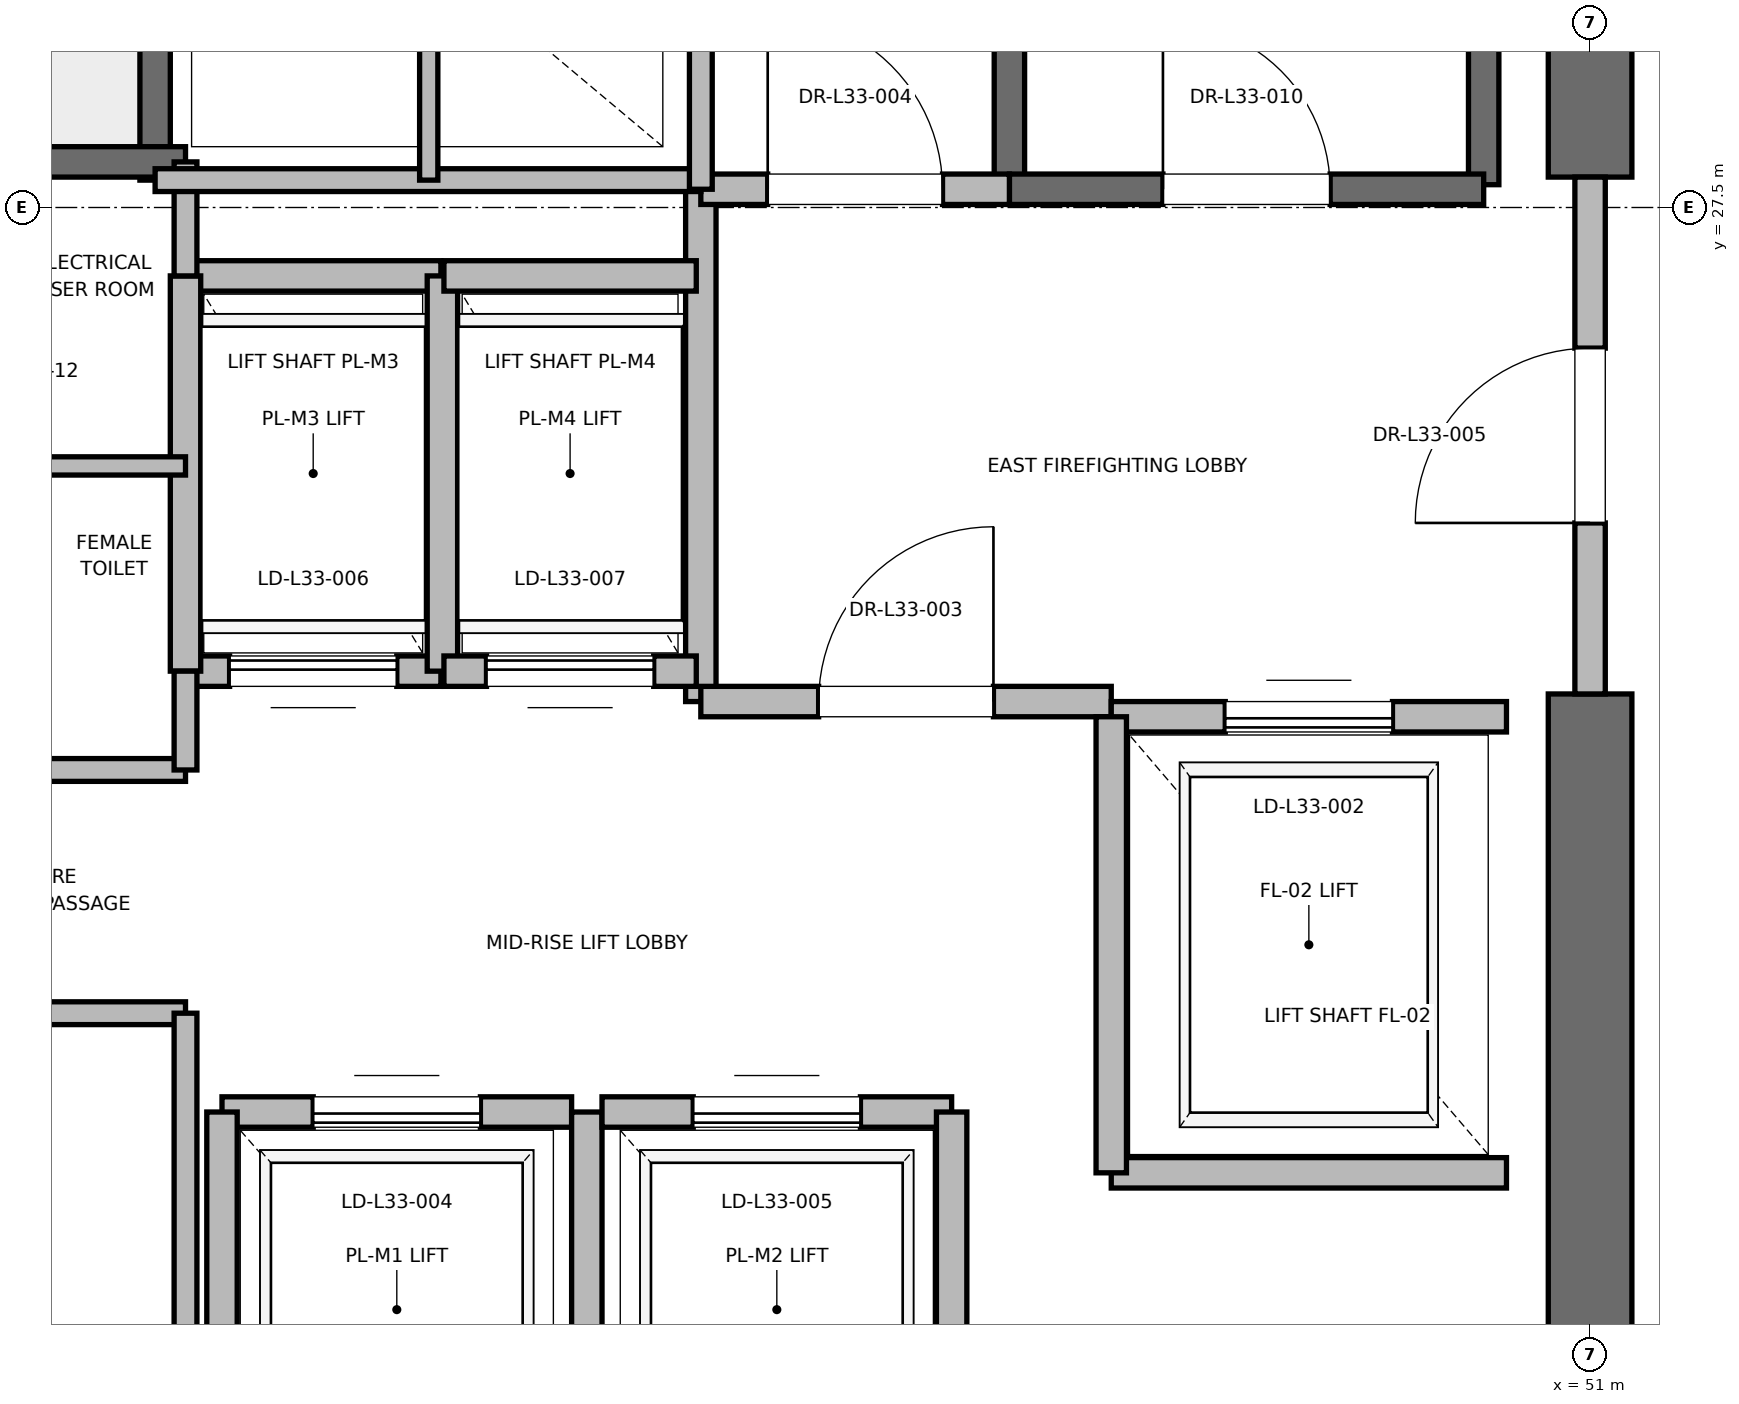
"""IFC4 building model, lengths in metres.
Left out: names, types, materials, properties, quantities, classifications, styles, units other than length and angle.
Written with IfcOpenShell. Run it as: python <this file> out.ifc"""

import sys

from ifc_helpers import new_model, si_unit, direction, frame, frame_2d, origin, place, context, subcontext, project, spatial, rectangle, extrude, element, fill, save


model = new_model("IFC4")
c1 = context("Model", 3, precision=1e-05, world=origin(), true_north=direction((0.0, 1.0)))
c2 = subcontext(c1, "Body", "Model", "MODEL_VIEW")
j1 = project(units=[si_unit("LENGTHUNIT", "METRE"), si_unit("PLANEANGLEUNIT", "RADIAN")], contexts=[c1])
p1 = place(None, origin())
s1 = spatial("IfcSite", under=j1, at=p1, CompositionType="ELEMENT")
p2 = place(p1, origin())
s2 = spatial("IfcBuilding", under=s1, at=p2, CompositionType="ELEMENT")
p3 = place(p2, frame((0.0, 0.0, 144.4)))
s3 = spatial("IfcBuildingStorey", under=s2, at=p3, CompositionType="ELEMENT", Elevation=144.4)
p4 = place(p3, frame((51.0, 18.5, 0.0), z_axis=(0.0, 0.0, 1.0), x_axis=(0.0, 1.0, 0.0)))
e1 = element("IfcWall", 1, at=p4, inside=s3, PredefinedType="SHEAR", context=c2, shape_type="SweptSolid", body=[
    extrude(rectangle(XDim=5.8, YDim=0.55, at=frame_2d((2.9, 0.0))), origin(), (0.0, 0.0, 1.0), 3.775),
])
p5 = place(p3, frame((51.0, 27.7, 0.0), z_axis=(0.0, 0.0, 1.0), x_axis=(0.0, 1.0, 0.0)))
e2 = element("IfcWall", 2, at=p5, inside=s3, PredefinedType="SHEAR", context=c2, shape_type="SweptSolid", body=[
    extrude(rectangle(XDim=8.8, YDim=0.55, at=frame_2d((4.4, 0.0))), origin(), (0.0, 0.0, 1.0), 3.775),
])
p6 = place(p3, frame((50.3, 27.65, 0.0), z_axis=(0.0, 0.0, 1.0), x_axis=(0.0, 1.0, 0.0)))
e3 = element("IfcWall", 3, at=p6, inside=s3, PredefinedType="SOLIDWALL", context=c2, shape_type="SweptSolid", body=[
    extrude(rectangle(XDim=8.15, YDim=0.2, at=frame_2d((4.075, 0.0))), origin(), (0.0, 0.0, 1.0), 3.775),
])
p7 = place(p3, frame((47.18, 27.62, 0.0), z_axis=(0.0, 0.0, 1.0), x_axis=(0.0, 1.0, 0.0)))
e4 = element("IfcWall", 4, at=p7, inside=s3, PredefinedType="SOLIDWALL", context=c2, shape_type="SweptSolid", body=[
    extrude(rectangle(XDim=8.18, YDim=0.2, at=frame_2d((4.09, 0.0))), origin(), (0.0, 0.0, 1.0), 3.775),
])
p8 = place(p3, frame((47.18, 27.62, 0.0), z_axis=(0.0, 0.0, 1.0), x_axis=(1.0, 0.0, 0.0)))
e5 = element("IfcWall", 5, at=p8, inside=s3, PredefinedType="SOLIDWALL", context=c2, shape_type="SweptSolid", body=[
    extrude(rectangle(XDim=3.12, YDim=0.2, at=frame_2d((1.56, 0.0))), origin(), (0.0, 0.0, 1.0), 3.775),
])
p9 = place(p8, frame((1.01, 0.0, 0.0)))
e6 = element("IfcOpeningElement", 6, at=p9, cuts=e5, PredefinedType="OPENING", context=c2, shape_type="SweptSolid", body=[
    extrude(rectangle(XDim=1.1, YDim=2.15, at=frame_2d((0.55, 1.075))), frame((0.0, 0.1, 0.0), z_axis=(0.0, -1.0, 0.0), x_axis=(1.0, 0.0, 0.0)), (0.0, 0.0, 1.0), 0.2),
])
p10 = place(p3, frame((41.56, 27.68, 0.0), z_axis=(0.0, 0.0, 1.0), x_axis=(0.0, 1.0, 0.0)))
e7 = element("IfcWall", 7, at=p10, inside=s3, PredefinedType="SOLIDWALL", context=c2, shape_type="SweptSolid", body=[
    extrude(rectangle(XDim=8.57, YDim=0.2, at=frame_2d((4.285, 0.0))), origin(), (0.0, 0.0, 1.0), 3.775),
])
p11 = place(p3, frame((38.44, 27.8, 0.0), z_axis=(0.0, 0.0, 1.0), x_axis=(1.0, 0.0, 0.0)))
e8 = element("IfcWall", 8, at=p11, inside=s3, PredefinedType="SOLIDWALL", context=c2, shape_type="SweptSolid", body=[
    extrude(rectangle(XDim=3.32, YDim=0.2, at=frame_2d((1.66, 0.0))), origin(), (0.0, 0.0, 1.0), 3.775),
])
p12 = place(p3, frame((45.15, 24.25, 0.0), z_axis=(0.0, 0.0, 1.0), x_axis=(0.0, 1.0, 0.0)))
e9 = element("IfcWall", 9, at=p12, inside=s3, PredefinedType="PARTITIONING", context=c2, shape_type="SweptSolid", body=[
    extrude(rectangle(XDim=3.37, YDim=0.2, at=frame_2d((1.685, 0.0))), origin(), (0.0, 0.0, 1.0), 3.775),
])
p13 = place(p3, frame((45.15, 24.25, 0.0), z_axis=(0.0, 0.0, 1.0), x_axis=(1.0, 0.0, 0.0)))
e10 = element("IfcWall", 10, at=p13, inside=s3, PredefinedType="PARTITIONING", context=c2, shape_type="SweptSolid", body=[
    extrude(rectangle(XDim=2.7, YDim=0.2, at=frame_2d((1.35, 0.0))), origin(), (0.0, 0.0, 1.0), 3.775),
])
p14 = place(p13, frame((0.775, 0.0, 0.0)))
e11 = element("IfcOpeningElement", 11, at=p14, cuts=e10, PredefinedType="OPENING", context=c2, shape_type="SweptSolid", body=[
    extrude(rectangle(XDim=1.15, YDim=2.2, at=frame_2d((0.575, 1.1))), frame((0.0, 0.1, 0.0), z_axis=(0.0, -1.0, 0.0), x_axis=(1.0, 0.0, 0.0)), (0.0, 0.0, 1.0), 0.2),
])
p15 = place(p3, frame((45.15, 27.62, 0.0), z_axis=(0.0, 0.0, 1.0), x_axis=(1.0, 0.0, 0.0)))
e12 = element("IfcWall", 12, at=p15, inside=s3, PredefinedType="PARTITIONING", context=c2, shape_type="SweptSolid", body=[
    extrude(rectangle(XDim=2.03, YDim=0.2, at=frame_2d((1.015, 0.0))), origin(), (0.0, 0.0, 1.0), 3.775),
])
p16 = place(p15, frame((0.44, 0.0, 0.0)))
e13 = element("IfcOpeningElement", 13, at=p16, cuts=e12, PredefinedType="OPENING", context=c2, shape_type="SweptSolid", body=[
    extrude(rectangle(XDim=1.15, YDim=2.2, at=frame_2d((0.575, 1.1))), frame((0.0, 0.1, 0.0), z_axis=(0.0, -1.0, 0.0), x_axis=(1.0, 0.0, 0.0)), (0.0, 0.0, 1.0), 0.2),
])
p17 = place(p3, frame((51.0, 24.3, 0.0), z_axis=(0.0, 0.0, 1.0), x_axis=(0.0, 1.0, 0.0)))
e14 = element("IfcWall", 14, at=p17, inside=s3, PredefinedType="PARTITIONING", context=c2, shape_type="SweptSolid", body=[
    extrude(rectangle(XDim=3.4, YDim=0.2, at=frame_2d((1.7, 0.0))), origin(), (0.0, 0.0, 1.0), 2.755),
])
p18 = place(p17, frame((1.125, 0.0, 0.0)))
e15 = element("IfcOpeningElement", 15, at=p18, cuts=e14, PredefinedType="OPENING", context=c2, shape_type="SweptSolid", body=[
    extrude(rectangle(XDim=1.15, YDim=2.2, at=frame_2d((0.575, 1.1))), frame((0.0, 0.1, 0.0), z_axis=(0.0, -1.0, 0.0), x_axis=(1.0, 0.0, 0.0)), (0.0, 0.0, 1.0), 0.2),
])
p19 = place(p3, frame((47.85, 21.15, 0.0), z_axis=(0.0, 0.0, 1.0), x_axis=(1.0, 0.0, 0.0)))
e16 = element("IfcWall", 16, at=p19, inside=s3, PredefinedType="SOLIDWALL", context=c2, shape_type="SweptSolid", body=[
    extrude(rectangle(XDim=2.6, YDim=0.2, at=frame_2d((1.3, 0.0))), origin(), (0.0, 0.0, 1.0), 3.775),
])
p20 = place(p3, frame((50.45, 24.15, 0.0), z_axis=(0.0, 0.0, 1.0), x_axis=(-1.0, 0.0, 0.0)))
e17 = element("IfcWall", 17, at=p20, inside=s3, PredefinedType="SOLIDWALL", context=c2, shape_type="SweptSolid", body=[
    extrude(rectangle(XDim=2.6, YDim=0.2, at=frame_2d((1.3, 0.0))), origin(), (0.0, 0.0, 1.0), 2.755),
])
p21 = place(p20, frame((0.75, 0.0, 0.0)))
e18 = element("IfcOpeningElement", 18, at=p21, cuts=e17, PredefinedType="OPENING", context=c2, shape_type="SweptSolid", body=[
    extrude(rectangle(XDim=1.1, YDim=2.2, at=frame_2d((0.55, 1.1))), frame((0.0, 0.1, 0.0), z_axis=(0.0, -1.0, 0.0), x_axis=(1.0, 0.0, 0.0)), (0.0, 0.0, 1.0), 0.2),
])
p22 = place(p3, frame((47.85, 24.15, 0.0), z_axis=(0.0, 0.0, 1.0), x_axis=(0.0, -1.0, 0.0)))
e19 = element("IfcWall", 19, at=p22, inside=s3, PredefinedType="SOLIDWALL", context=c2, shape_type="SweptSolid", body=[
    extrude(rectangle(XDim=3.0, YDim=0.2, at=frame_2d((1.5, 0.0))), origin(), (0.0, 0.0, 1.0), 3.775),
])
p23 = place(p3, frame((44.3, 21.55, 0.0), z_axis=(0.0, 0.0, 1.0), x_axis=(-1.0, 0.0, 0.0)))
e20 = element("IfcWall", 20, at=p23, inside=s3, PredefinedType="SOLIDWALL", context=c2, shape_type="SweptSolid", body=[
    extrude(rectangle(XDim=2.3, YDim=0.2, at=frame_2d((1.15, 0.0))), origin(), (0.0, 0.0, 1.0), 3.775),
])
p24 = place(p23, frame((0.6, 0.0, 0.0)))
e21 = element("IfcOpeningElement", 21, at=p24, cuts=e20, PredefinedType="OPENING", context=c2, shape_type="SweptSolid", body=[
    extrude(rectangle(XDim=1.1, YDim=2.2, at=frame_2d((0.55, 1.1))), frame((0.0, 0.1, 0.0), z_axis=(0.0, -1.0, 0.0), x_axis=(1.0, 0.0, 0.0)), (0.0, 0.0, 1.0), 0.2),
])
p25 = place(p3, frame((42.0, 21.55, 0.0), z_axis=(0.0, 0.0, 1.0), x_axis=(0.0, -1.0, 0.0)))
e22 = element("IfcWall", 22, at=p25, inside=s3, PredefinedType="SOLIDWALL", context=c2, shape_type="SweptSolid", body=[
    extrude(rectangle(XDim=2.6, YDim=0.2, at=frame_2d((1.3, 0.0))), origin(), (0.0, 0.0, 1.0), 2.755),
])
p26 = place(p3, frame((44.4, 18.95, 0.0), z_axis=(0.0, 0.0, 1.0), x_axis=(0.0, 1.0, 0.0)))
e23 = element("IfcWall", 23, at=p26, inside=s3, PredefinedType="SOLIDWALL", context=c2, shape_type="SweptSolid", body=[
    extrude(rectangle(XDim=2.6, YDim=0.2, at=frame_2d((1.3, 0.0))), origin(), (0.0, 0.0, 1.0), 3.775),
])
p27 = place(p3, frame((46.8, 21.55, 0.0), z_axis=(0.0, 0.0, 1.0), x_axis=(-1.0, 0.0, 0.0)))
e24 = element("IfcWall", 24, at=p27, inside=s3, PredefinedType="SOLIDWALL", context=c2, shape_type="SweptSolid", body=[
    extrude(rectangle(XDim=2.3, YDim=0.2, at=frame_2d((1.15, 0.0))), origin(), (0.0, 0.0, 1.0), 3.775),
])
p28 = place(p27, frame((0.6, 0.0, 0.0)))
e25 = element("IfcOpeningElement", 25, at=p28, cuts=e24, PredefinedType="OPENING", context=c2, shape_type="SweptSolid", body=[
    extrude(rectangle(XDim=1.1, YDim=2.2, at=frame_2d((0.55, 1.1))), frame((0.0, 0.1, 0.0), z_axis=(0.0, -1.0, 0.0), x_axis=(1.0, 0.0, 0.0)), (0.0, 0.0, 1.0), 0.2),
])
p29 = place(p3, frame((46.8, 18.95, 0.0), z_axis=(0.0, 0.0, 1.0), x_axis=(0.0, 1.0, 0.0)))
e26 = element("IfcWall", 26, at=p29, inside=s3, PredefinedType="SOLIDWALL", context=c2, shape_type="SweptSolid", body=[
    extrude(rectangle(XDim=2.6, YDim=0.2, at=frame_2d((1.3, 0.0))), origin(), (0.0, 0.0, 1.0), 3.775),
])
p30 = place(p3, frame((41.76, 24.45, 0.0), z_axis=(0.0, 0.0, 1.0), x_axis=(1.0, 0.0, 0.0)))
e27 = element("IfcWall", 27, at=p30, inside=s3, PredefinedType="SOLIDWALL", context=c2, shape_type="SweptSolid", body=[
    extrude(rectangle(XDim=1.68, YDim=0.2, at=frame_2d((0.84, 0.0))), origin(), (0.0, 0.0, 1.0), 3.775),
])
p31 = place(p30, frame((0.29, 0.0, 0.0)))
e28 = element("IfcOpeningElement", 28, at=p31, cuts=e27, PredefinedType="OPENING", context=c2, shape_type="SweptSolid", body=[
    extrude(rectangle(XDim=1.1, YDim=2.2, at=frame_2d((0.55, 1.1))), frame((0.0, 0.1, 0.0), z_axis=(0.0, -1.0, 0.0), x_axis=(1.0, 0.0, 0.0)), (0.0, 0.0, 1.0), 0.2),
])
p32 = place(p3, frame((43.44, 27.05, 0.0), z_axis=(0.0, 0.0, 1.0), x_axis=(-1.0, 0.0, 0.0)))
e29 = element("IfcWall", 29, at=p32, inside=s3, PredefinedType="SOLIDWALL", context=c2, shape_type="SweptSolid", body=[
    extrude(rectangle(XDim=1.68, YDim=0.2, at=frame_2d((0.84, 0.0))), origin(), (0.0, 0.0, 1.0), 3.775),
])
for number, where, z_axis, x_axis in (
    (30, (41.76, 27.05, 0.0), (0.0, 0.0, 1.0), (0.0, -1.0, 0.0)),
    (31, (43.45, 24.45, 0.0), (0.0, 0.0, 1.0), (0.0, 1.0, 0.0)),
):
    element("IfcWall", number, at=place(p3, frame(where, z_axis=z_axis, x_axis=x_axis)), inside=s3, PredefinedType="SOLIDWALL", context=c2, shape_type="SweptSolid", body=[
        extrude(rectangle(XDim=2.6, YDim=0.2, at=frame_2d((1.3, 0.0))), origin(), (0.0, 0.0, 1.0), 3.775),
    ])
p33 = place(p3, frame((43.46, 24.45, 0.0), z_axis=(0.0, 0.0, 1.0), x_axis=(1.0, 0.0, 0.0)))
e32 = element("IfcWall", 32, at=p33, inside=s3, PredefinedType="SOLIDWALL", context=c2, shape_type="SweptSolid", body=[
    extrude(rectangle(XDim=1.66, YDim=0.2, at=frame_2d((0.83, 0.0))), origin(), (0.0, 0.0, 1.0), 3.775),
])
p34 = place(p33, frame((0.28, 0.0, 0.0)))
e33 = element("IfcOpeningElement", 33, at=p34, cuts=e32, PredefinedType="OPENING", context=c2, shape_type="SweptSolid", body=[
    extrude(rectangle(XDim=1.1, YDim=2.2, at=frame_2d((0.55, 1.1))), frame((0.0, 0.1, 0.0), z_axis=(0.0, -1.0, 0.0), x_axis=(1.0, 0.0, 0.0)), (0.0, 0.0, 1.0), 0.2),
])
p35 = place(p3, frame((45.12, 27.05, 0.0), z_axis=(0.0, 0.0, 1.0), x_axis=(-1.0, 0.0, 0.0)))
e34 = element("IfcWall", 34, at=p35, inside=s3, PredefinedType="SOLIDWALL", context=c2, shape_type="SweptSolid", body=[
    extrude(rectangle(XDim=1.66, YDim=0.2, at=frame_2d((0.83, 0.0))), origin(), (0.0, 0.0, 1.0), 3.775),
])
for number, where, z_axis, x_axis in (
    (35, (39.95, 22.2, 0.0), (0.0, 0.0, 1.0), (1.0, 0.0, 0.0)),
    (36, (39.95, 23.8, 0.0), (0.0, 0.0, 1.0), (1.0, 0.0, 0.0)),
):
    element("IfcWall", number, at=place(p3, frame(where, z_axis=z_axis, x_axis=x_axis)), inside=s3, PredefinedType="PARTITIONING", context=c2, shape_type="SweptSolid", body=[
        extrude(rectangle(XDim=1.81, YDim=0.15, at=frame_2d((0.905, 0.0))), origin(), (0.0, 0.0, 1.0), 2.85),
    ])
p36 = place(p3, frame((39.95, 25.8, 0.0), z_axis=(0.0, 0.0, 1.0), x_axis=(1.0, 0.0, 0.0)))
e37 = element("IfcWall", 37, at=p36, inside=s3, PredefinedType="PARTITIONING", context=c2, shape_type="SweptSolid", body=[
    extrude(rectangle(XDim=1.81, YDim=0.12, at=frame_2d((0.905, 0.0))), origin(), (0.0, 0.0, 1.0), 2.85),
])
p37 = place(p3, frame((41.76, 18.6, 0.0), z_axis=(0.0, 0.0, 1.0), x_axis=(0.0, 1.0, 0.0)))
e38 = element("IfcWall", 38, at=p37, inside=s3, PredefinedType="PARTITIONING", context=c2, shape_type="SweptSolid", body=[
    extrude(rectangle(XDim=3.6, YDim=0.15, at=frame_2d((1.8, 0.0))), origin(), (0.0, 0.0, 1.0), 2.755),
])
p38 = place(p3, frame((41.76, 23.8, 0.0), z_axis=(0.0, 0.0, 1.0), x_axis=(0.0, 1.0, 0.0)))
e39 = element("IfcWall", 39, at=p38, inside=s3, PredefinedType="PARTITIONING", context=c2, shape_type="SweptSolid", body=[
    extrude(rectangle(XDim=0.65, YDim=0.15, at=frame_2d((0.325, 0.0))), origin(), (0.0, 0.0, 1.0), 2.85),
])
p39 = place(p3, frame((41.76, 27.05, 0.0), z_axis=(0.0, 0.0, 1.0), x_axis=(0.0, 1.0, 0.0)))
e40 = element("IfcWall", 40, at=p39, inside=s3, PredefinedType="PARTITIONING", context=c2, shape_type="SweptSolid", body=[
    extrude(rectangle(XDim=0.75, YDim=0.15, at=frame_2d((0.375, 0.0))), origin(), (0.0, 0.0, 1.0), 2.85),
])
p40 = place(p3, frame((41.56, 27.68, 0.0), z_axis=(0.0, 0.0, 1.0), x_axis=(1.0, 0.0, 0.0)))
e41 = element("IfcWall", 41, at=p40, inside=s3, PredefinedType="PARTITIONING", context=c2, shape_type="SweptSolid", body=[
    extrude(rectangle(XDim=3.59, YDim=0.15, at=frame_2d((1.795, 0.0))), origin(), (0.0, 0.0, 1.0), 2.85),
])
p41 = place(p3, frame((45.15, 27.62, 0.0), z_axis=(0.0, 0.0, 1.0), x_axis=(0.0, 1.0, 0.0)))
e42 = element("IfcWall", 42, at=p41, inside=s3, PredefinedType="PARTITIONING", context=c2, shape_type="SweptSolid", body=[
    extrude(rectangle(XDim=3.1, YDim=0.15, at=frame_2d((1.55, 0.0))), origin(), (0.0, 0.0, 1.0), 2.85),
])
p42 = place(p3, frame((43.36, 27.68, 0.0), z_axis=(0.0, 0.0, 1.0), x_axis=(0.0, 1.0, 0.0)))
e43 = element("IfcWall", 43, at=p42, inside=s3, PredefinedType="PARTITIONING", context=c2, shape_type="SweptSolid", body=[
    extrude(rectangle(XDim=3.04, YDim=0.12, at=frame_2d((1.52, 0.0))), origin(), (0.0, 0.0, 1.0), 2.85),
])
p43 = place(p9, origin())
e44 = element("IfcDoor", 44, at=p43, inside=s3, OperationType="SINGLE_SWING_LEFT", PredefinedType="DOOR", context=c2, shape_type="SweptSolid", body=[
    extrude(rectangle(XDim=1.1, YDim=2.15, at=frame_2d((0.55, 1.075))), frame((0.0, 0.025, 0.0), z_axis=(0.0, -1.0, 0.0), x_axis=(1.0, 0.0, 0.0)), (0.0, 0.0, 1.0), 0.05),
])
fill(e6, e44)
p44 = place(p14, origin())
e45 = element("IfcDoor", 45, at=p44, inside=s3, OperationType="SINGLE_SWING_RIGHT", PredefinedType="DOOR", context=c2, shape_type="SweptSolid", body=[
    extrude(rectangle(XDim=1.15, YDim=2.2, at=frame_2d((0.575, 1.1))), frame((0.0, 0.025, 0.0), z_axis=(0.0, -1.0, 0.0), x_axis=(1.0, 0.0, 0.0)), (0.0, 0.0, 1.0), 0.05),
])
fill(e11, e45)
p45 = place(p16, origin())
e46 = element("IfcDoor", 46, at=p45, inside=s3, OperationType="SINGLE_SWING_LEFT", PredefinedType="DOOR", context=c2, shape_type="SweptSolid", body=[
    extrude(rectangle(XDim=1.15, YDim=2.2, at=frame_2d((0.575, 1.1))), frame((0.0, 0.025, 0.0), z_axis=(0.0, -1.0, 0.0), x_axis=(1.0, 0.0, 0.0)), (0.0, 0.0, 1.0), 0.05),
])
fill(e13, e46)
p46 = place(p18, origin())
e47 = element("IfcDoor", 47, at=p46, inside=s3, OperationType="SINGLE_SWING_LEFT", PredefinedType="DOOR", context=c2, shape_type="SweptSolid", body=[
    extrude(rectangle(XDim=1.15, YDim=2.2, at=frame_2d((0.575, 1.1))), frame((0.0, 0.025, 0.0), z_axis=(0.0, -1.0, 0.0), x_axis=(1.0, 0.0, 0.0)), (0.0, 0.0, 1.0), 0.05),
])
fill(e15, e47)
p47 = place(p21, origin())
e48 = element("IfcDoor", 48, at=p47, inside=s3, OperationType="SLIDING_TO_RIGHT", PredefinedType="DOOR", context=c2, shape_type="SweptSolid", body=[
    extrude(rectangle(XDim=1.1, YDim=2.2, at=frame_2d((0.55, 1.1))), frame((0.0, 0.025, 0.0), z_axis=(0.0, -1.0, 0.0), x_axis=(1.0, 0.0, 0.0)), (0.0, 0.0, 1.0), 0.05),
])
fill(e18, e48)
p48 = place(p24, origin())
e49 = element("IfcDoor", 49, at=p48, inside=s3, OperationType="SLIDING_TO_RIGHT", PredefinedType="DOOR", context=c2, shape_type="SweptSolid", body=[
    extrude(rectangle(XDim=1.1, YDim=2.2, at=frame_2d((0.55, 1.1))), frame((0.0, 0.025, 0.0), z_axis=(0.0, -1.0, 0.0), x_axis=(1.0, 0.0, 0.0)), (0.0, 0.0, 1.0), 0.05),
])
fill(e21, e49)
p49 = place(p28, origin())
e50 = element("IfcDoor", 50, at=p49, inside=s3, OperationType="SLIDING_TO_RIGHT", PredefinedType="DOOR", context=c2, shape_type="SweptSolid", body=[
    extrude(rectangle(XDim=1.1, YDim=2.2, at=frame_2d((0.55, 1.1))), frame((0.0, 0.025, 0.0), z_axis=(0.0, -1.0, 0.0), x_axis=(1.0, 0.0, 0.0)), (0.0, 0.0, 1.0), 0.05),
])
fill(e25, e50)
p50 = place(p31, origin())
e51 = element("IfcDoor", 51, at=p50, inside=s3, OperationType="SLIDING_TO_RIGHT", PredefinedType="DOOR", context=c2, shape_type="SweptSolid", body=[
    extrude(rectangle(XDim=1.1, YDim=2.2, at=frame_2d((0.55, 1.1))), frame((0.0, 0.025, 0.0), z_axis=(0.0, -1.0, 0.0), x_axis=(1.0, 0.0, 0.0)), (0.0, 0.0, 1.0), 0.05),
])
fill(e28, e51)
p51 = place(p34, origin())
e52 = element("IfcDoor", 52, at=p51, inside=s3, OperationType="SLIDING_TO_RIGHT", PredefinedType="DOOR", context=c2, shape_type="SweptSolid", body=[
    extrude(rectangle(XDim=1.1, YDim=2.2, at=frame_2d((0.55, 1.1))), frame((0.0, 0.025, 0.0), z_axis=(0.0, -1.0, 0.0), x_axis=(1.0, 0.0, 0.0)), (0.0, 0.0, 1.0), 0.05),
])
fill(e33, e52)
save(model, sys.argv[1])
